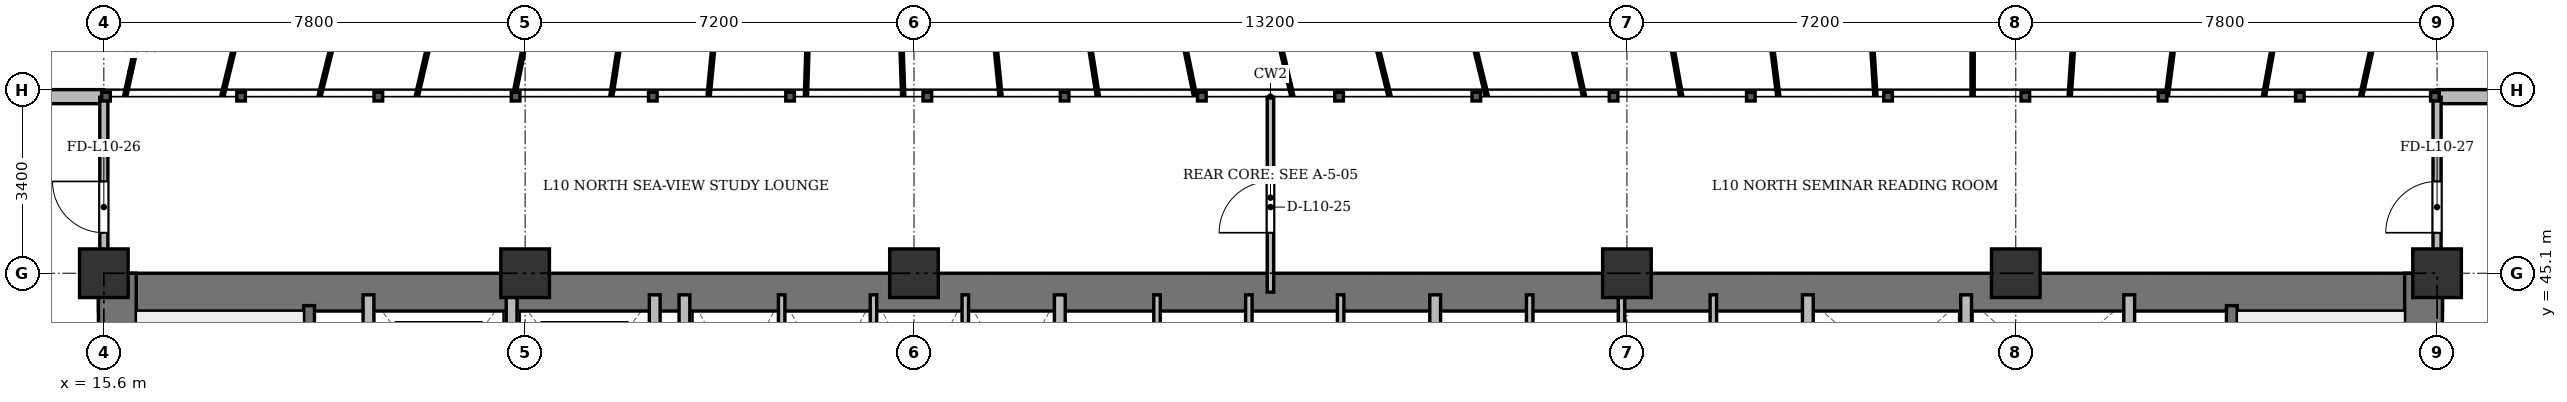
"""IFC4 building model, lengths in metres.
Left out: names, types, materials, properties, quantities, classifications, styles, units other than length and angle.
Written with IfcOpenShell. Run it as: python <this file> out.ifc"""

import sys

from ifc_helpers import new_model, si_unit, direction, frame, frame_2d, origin, origin_2d, place, context, subcontext, project, spatial, rectangle, extrude, source, transform, mapped, element, fill, save


model = new_model("IFC4")
c1 = context("Model", 3, precision=1e-05, world=origin(), true_north=direction((0.0, 1.0)))
c2 = subcontext(c1, "Body", "Model", "MODEL_VIEW")
j1 = project(units=[si_unit("LENGTHUNIT", "METRE"), si_unit("PLANEANGLEUNIT", "RADIAN")], contexts=[c1])
p1 = place(None, origin())
s1 = spatial("IfcSite", under=j1, at=p1, CompositionType="ELEMENT")
p2 = place(p1, origin())
s2 = spatial("IfcBuilding", under=s1, at=p2, CompositionType="ELEMENT")
p3 = place(p2, frame((0.0, 0.0, 41.5)))
s3 = spatial("IfcBuildingStorey", under=s2, at=p3, CompositionType="ELEMENT", Elevation=41.5)
m1 = source(origin(), c2, "Body", "SweptSolid", [
    extrude(rectangle(XDim=0.9, YDim=0.9, at=origin_2d()), origin(), (0.0, 0.0, 1.0), 3.6),
])
for number, where, z_axis, x_axis in (
    (1, (15.6, 45.1, 0.0), (0.0, 0.0, 1.0), (1.0, 0.0, 0.0)),
    (2, (23.4, 45.1, 0.0), (0.0, 0.0, 1.0), (1.0, 0.0, 0.0)),
    (3, (30.6, 45.1, 0.0), (0.0, 0.0, 1.0), (1.0, 0.0, 0.0)),
    (4, (43.8, 45.1, 0.0), (0.0, 0.0, 1.0), (1.0, 0.0, 0.0)),
    (5, (51.0, 45.1, 0.0), (0.0, 0.0, 1.0), (1.0, 0.0, 0.0)),
    (6, (58.8, 45.1, 0.0), (0.0, 0.0, 1.0), (1.0, 0.0, 0.0)),
):
    element("IfcColumn", number, at=place(p3, frame(where, z_axis=z_axis, x_axis=x_axis)), inside=s3, PredefinedType="COLUMN", context=c2, shape_type="MappedRepresentation", body=[
        mapped(m1, transform((0.0, 0.0, 0.0), x_axis=(1.0, 0.0, 0.0), y_axis=(0.0, 1.0, 0.0), z_axis=(0.0, 0.0, 1.0), scale=1.0)),
    ])
p4 = place(p3, frame((7.6, 48.37, 0.0), z_axis=(0.0, 0.0, 1.0), x_axis=(1.0, 0.0, 0.0)))
e7 = element("IfcWall", 7, at=p4, inside=s3, PredefinedType="SOLIDWALL", context=c2, shape_type="SweptSolid", body=[
    extrude(rectangle(XDim=8.0, YDim=0.26, at=frame_2d((4.0, 0.0))), origin(), (0.0, 0.0, 1.0), 3.34),
])
p5 = place(p4, frame((3.308, 0.0, 0.9)))
e8 = element("IfcOpeningElement", 8, at=p5, cuts=e7, PredefinedType="OPENING", context=c2, shape_type="SweptSolid", body=[
    extrude(rectangle(XDim=1.2, YDim=1.65, at=frame_2d((0.6, 0.825))), frame((0.0, 0.14, 0.0), z_axis=(0.0, -1.0, 0.0), x_axis=(1.0, 0.0, 0.0)), (0.0, 0.0, 1.0), 0.28),
])
p6 = place(p3, frame((58.8, 48.37, 0.0), z_axis=(0.0, 0.0, 1.0), x_axis=(1.0, 0.0, 0.0)))
e9 = element("IfcWall", 9, at=p6, inside=s3, PredefinedType="SOLIDWALL", context=c2, shape_type="SweptSolid", body=[
    extrude(rectangle(XDim=8.0, YDim=0.26, at=frame_2d((4.0, 0.0))), origin(), (0.0, 0.0, 1.0), 3.34),
])
p7 = place(p6, frame((3.308, 0.0, 0.9)))
e10 = element("IfcOpeningElement", 10, at=p7, cuts=e9, PredefinedType="OPENING", context=c2, shape_type="SweptSolid", body=[
    extrude(rectangle(XDim=1.2, YDim=1.65, at=frame_2d((0.6, 0.825))), frame((0.0, 0.14, 0.0), z_axis=(0.0, -1.0, 0.0), x_axis=(1.0, 0.0, 0.0)), (0.0, 0.0, 1.0), 0.28),
])
p8 = place(p3, frame((15.5, 44.75, 0.0), z_axis=(0.0, 0.0, 1.0), x_axis=(1.0, 0.0, 0.0)))
e11 = element("IfcWall", 11, at=p8, inside=s3, PredefinedType="SHEAR", context=c2, shape_type="SweptSolid", body=[
    extrude(rectangle(XDim=43.4, YDim=0.7, at=frame_2d((21.7, 0.0))), origin(), (0.0, 0.0, 1.0), 3.34),
])
for number, where, z_axis, x_axis in (
    (12, (15.85, 33.4, 0.0), (0.0, 0.0, 1.0), (0.0, 1.0, 0.0)),
    (13, (58.55, 33.4, 0.0), (0.0, 0.0, 1.0), (0.0, 1.0, 0.0)),
):
    element("IfcWall", number, at=place(p3, frame(where, z_axis=z_axis, x_axis=x_axis)), inside=s3, PredefinedType="SHEAR", context=c2, shape_type="SweptSolid", body=[
        extrude(rectangle(XDim=11.7, YDim=0.7, at=frame_2d((5.85, 0.0))), origin(), (0.0, 0.0, 1.0), 3.34),
    ])
p9 = place(p3, frame((19.4, 33.4, 0.0), z_axis=(0.0, 0.0, 1.0), x_axis=(0.0, 1.0, 0.0)))
e14 = element("IfcWall", 14, at=p9, inside=s3, PredefinedType="SHEAR", context=c2, shape_type="SweptSolid", body=[
    extrude(rectangle(XDim=11.1, YDim=0.2, at=frame_2d((5.55, 0.0))), origin(), (0.0, 0.0, 1.0), 3.34),
])
p10 = place(p9, frame((0.85, 0.0, 0.0)))
e15 = element("IfcOpeningElement", 15, at=p10, cuts=e14, PredefinedType="OPENING", context=c2, shape_type="SweptSolid", body=[
    extrude(rectangle(XDim=1.1, YDim=2.15, at=frame_2d((0.55, 1.075))), frame((0.0, 0.11, 0.0), z_axis=(0.0, -1.0, 0.0), x_axis=(1.0, 0.0, 0.0)), (0.0, 0.0, 1.0), 0.22),
])
p11 = place(p3, frame((55.0, 33.4, 0.0), z_axis=(0.0, 0.0, 1.0), x_axis=(0.0, 1.0, 0.0)))
e16 = element("IfcWall", 16, at=p11, inside=s3, PredefinedType="SHEAR", context=c2, shape_type="SweptSolid", body=[
    extrude(rectangle(XDim=11.1, YDim=0.2, at=frame_2d((5.55, 0.0))), origin(), (0.0, 0.0, 1.0), 3.34),
])
p12 = place(p11, frame((0.85, 0.0, 0.0)))
e17 = element("IfcOpeningElement", 17, at=p12, cuts=e16, PredefinedType="OPENING", context=c2, shape_type="SweptSolid", body=[
    extrude(rectangle(XDim=1.1, YDim=2.15, at=frame_2d((0.55, 1.075))), frame((0.0, 0.11, 0.0), z_axis=(0.0, -1.0, 0.0), x_axis=(1.0, 0.0, 0.0)), (0.0, 0.0, 1.0), 0.22),
])
for number, where, z_axis, x_axis in (
    (18, (20.5, 41.3, 0.0), (0.0, 0.0, 1.0), (0.0, 1.0, 0.0)),
    (19, (23.15, 41.3, 0.0), (0.0, 0.0, 1.0), (0.0, 1.0, 0.0)),
    (20, (25.8, 41.3, 0.0), (0.0, 0.0, 1.0), (0.0, 1.0, 0.0)),
):
    element("IfcWall", number, at=place(p3, frame(where, z_axis=z_axis, x_axis=x_axis)), inside=s3, PredefinedType="SOLIDWALL", context=c2, shape_type="SweptSolid", body=[
        extrude(rectangle(XDim=3.4, YDim=0.2, at=frame_2d((1.7, 0.0))), origin(), (0.0, 0.0, 1.0), 3.34),
    ])
p13 = place(p3, frame((26.35, 33.4, 0.0), z_axis=(0.0, 0.0, 1.0), x_axis=(0.0, 1.0, 0.0)))
e21 = element("IfcWall", 21, at=p13, inside=s3, PredefinedType="SOLIDWALL", context=c2, shape_type="SweptSolid", body=[
    extrude(rectangle(XDim=11.3, YDim=0.2, at=frame_2d((5.65, 0.0))), origin(), (0.0, 0.0, 1.0), 2.69),
])
p14 = place(p3, frame((33.3, 41.5, 0.0), z_axis=(0.0, 0.0, 1.0), x_axis=(0.0, 1.0, 0.0)))
e22 = element("IfcWall", 22, at=p14, inside=s3, PredefinedType="SOLIDWALL", context=c2, shape_type="SweptSolid", body=[
    extrude(rectangle(XDim=3.2, YDim=0.2, at=frame_2d((1.6, 0.0))), origin(), (0.0, 0.0, 1.0), 3.34),
])
for number, where, z_axis, x_axis in (
    (23, (28.15, 41.5, 0.0), (0.0, 0.0, 1.0), (0.0, 1.0, 0.0)),
    (24, (29.85, 41.5, 0.0), (0.0, 0.0, 1.0), (0.0, 1.0, 0.0)),
    (25, (31.55, 41.5, 0.0), (0.0, 0.0, 1.0), (0.0, 1.0, 0.0)),
    (26, (35.1, 41.5, 0.0), (0.0, 0.0, 1.0), (0.0, 1.0, 0.0)),
    (27, (36.8, 41.5, 0.0), (0.0, 0.0, 1.0), (0.0, 1.0, 0.0)),
    (28, (38.5, 41.5, 0.0), (0.0, 0.0, 1.0), (0.0, 1.0, 0.0)),
):
    element("IfcWall", number, at=place(p3, frame(where, z_axis=z_axis, x_axis=x_axis)), inside=s3, PredefinedType="PARTITIONING", context=c2, shape_type="SweptSolid", body=[
        extrude(rectangle(XDim=3.2, YDim=0.12, at=frame_2d((1.6, 0.0))), origin(), (0.0, 0.0, 1.0), 3.34),
    ])
p15 = place(p3, frame((40.25, 41.5, 0.0), z_axis=(0.0, 0.0, 1.0), x_axis=(0.0, 1.0, 0.0)))
e29 = element("IfcWall", 29, at=p15, inside=s3, PredefinedType="SOLIDWALL", context=c2, shape_type="SweptSolid", body=[
    extrude(rectangle(XDim=3.2, YDim=0.2, at=frame_2d((1.6, 0.0))), origin(), (0.0, 0.0, 1.0), 3.34),
])
p16 = place(p3, frame((42.0, 41.5, 0.0), z_axis=(0.0, 0.0, 1.0), x_axis=(0.0, 1.0, 0.0)))
e30 = element("IfcWall", 30, at=p16, inside=s3, PredefinedType="PARTITIONING", context=c2, shape_type="SweptSolid", body=[
    extrude(rectangle(XDim=3.2, YDim=0.12, at=frame_2d((1.6, 0.0))), origin(), (0.0, 0.0, 1.0), 3.34),
])
p17 = place(p3, frame((43.7, 41.5, 0.0), z_axis=(0.0, 0.0, 1.0), x_axis=(0.0, 1.0, 0.0)))
e31 = element("IfcWall", 31, at=p17, inside=s3, PredefinedType="PARTITIONING", context=c2, shape_type="SweptSolid", body=[
    extrude(rectangle(XDim=3.2, YDim=0.12, at=frame_2d((1.6, 0.0))), origin(), (0.0, 0.0, 1.0), 2.752),
])
p18 = place(p3, frame((45.4, 41.5, 0.0), z_axis=(0.0, 0.0, 1.0), x_axis=(0.0, 1.0, 0.0)))
e32 = element("IfcWall", 32, at=p18, inside=s3, PredefinedType="PARTITIONING", context=c2, shape_type="SweptSolid", body=[
    extrude(rectangle(XDim=3.2, YDim=0.12, at=frame_2d((1.6, 0.0))), origin(), (0.0, 0.0, 1.0), 3.34),
])
p19 = place(p3, frame((47.15, 33.4, 0.0), z_axis=(0.0, 0.0, 1.0), x_axis=(0.0, 1.0, 0.0)))
e33 = element("IfcWall", 33, at=p19, inside=s3, PredefinedType="SOLIDWALL", context=c2, shape_type="SweptSolid", body=[
    extrude(rectangle(XDim=11.3, YDim=0.2, at=frame_2d((5.65, 0.0))), origin(), (0.0, 0.0, 1.0), 2.69),
])
for number, where, z_axis, x_axis in (
    (34, (50.08, 42.05, 0.0), (0.0, 0.0, 1.0), (0.0, 1.0, 0.0)),
    (35, (53.1, 42.05, 0.0), (0.0, 0.0, 1.0), (0.0, 1.0, 0.0)),
):
    element("IfcWall", number, at=place(p3, frame(where, z_axis=z_axis, x_axis=x_axis)), inside=s3, PredefinedType="SOLIDWALL", context=c2, shape_type="SweptSolid", body=[
        extrude(rectangle(XDim=2.65, YDim=0.2, at=frame_2d((1.325, 0.0))), origin(), (0.0, 0.0, 1.0), 3.34),
    ])
p20 = place(p3, frame((37.2, 44.75, 0.0), z_axis=(0.0, 0.0, 1.0), x_axis=(0.0, 1.0, 0.0)))
e36 = element("IfcWall", 36, at=p20, inside=s3, PredefinedType="PARTITIONING", context=c2, shape_type="SweptSolid", body=[
    extrude(rectangle(XDim=3.61, YDim=0.12, at=frame_2d((1.805, 0.0))), origin(), (0.0, 0.0, 1.0), 2.69),
])
p21 = place(p20, frame((1.1, 0.0, 0.0)))
e37 = element("IfcOpeningElement", 37, at=p21, cuts=e36, PredefinedType="OPENING", context=c2, shape_type="SweptSolid", body=[
    extrude(rectangle(XDim=0.95, YDim=2.15, at=frame_2d((0.475, 1.075))), frame((0.0, 0.07, 0.0), z_axis=(0.0, -1.0, 0.0), x_axis=(1.0, 0.0, 0.0)), (0.0, 0.0, 1.0), 0.14),
])
p22 = place(p3, frame((15.6, 44.75, 0.0), z_axis=(0.0, 0.0, 1.0), x_axis=(0.0, 1.0, 0.0)))
e38 = element("IfcWall", 38, at=p22, inside=s3, PredefinedType="PARTITIONING", context=c2, shape_type="SweptSolid", body=[
    extrude(rectangle(XDim=3.61, YDim=0.15, at=frame_2d((1.805, 0.0))), origin(), (0.0, 0.0, 1.0), 2.752),
])
p23 = place(p22, frame((1.1, 0.0, 0.0)))
e39 = element("IfcOpeningElement", 39, at=p23, cuts=e38, PredefinedType="OPENING", context=c2, shape_type="SweptSolid", body=[
    extrude(rectangle(XDim=0.95, YDim=2.15, at=frame_2d((0.475, 1.075))), frame((0.0, 0.085, 0.0), z_axis=(0.0, -1.0, 0.0), x_axis=(1.0, 0.0, 0.0)), (0.0, 0.0, 1.0), 0.17),
])
p24 = place(p3, frame((58.8, 44.75, 0.0), z_axis=(0.0, 0.0, 1.0), x_axis=(0.0, 1.0, 0.0)))
e40 = element("IfcWall", 40, at=p24, inside=s3, PredefinedType="PARTITIONING", context=c2, shape_type="SweptSolid", body=[
    extrude(rectangle(XDim=3.61, YDim=0.15, at=frame_2d((1.805, 0.0))), origin(), (0.0, 0.0, 1.0), 2.752),
])
p25 = place(p24, frame((1.1, 0.0, 0.0)))
e41 = element("IfcOpeningElement", 41, at=p25, cuts=e40, PredefinedType="OPENING", context=c2, shape_type="SweptSolid", body=[
    extrude(rectangle(XDim=0.95, YDim=2.15, at=frame_2d((0.475, 1.075))), frame((0.0, 0.085, 0.0), z_axis=(0.0, -1.0, 0.0), x_axis=(1.0, 0.0, 0.0)), (0.0, 0.0, 1.0), 0.17),
])
m2 = source(origin(), c2, "Body", "SweptSolid", [
    extrude(rectangle(XDim=0.95, YDim=2.15, at=frame_2d((0.475, 1.075))), frame((0.0, 0.025, 0.0), z_axis=(0.0, -1.0, 0.0), x_axis=(1.0, 0.0, 0.0)), (0.0, 0.0, 1.0), 0.05),
])
p26 = place(p21, origin())
e42 = element("IfcDoor", 42, at=p26, inside=s3, OperationType="SINGLE_SWING_LEFT", PredefinedType="DOOR", context=c2, shape_type="MappedRepresentation", body=[
    mapped(m2, transform((0.0, 0.0, 0.0), x_axis=(1.0, 0.0, 0.0), y_axis=(0.0, 1.0, 0.0), z_axis=(0.0, 0.0, 1.0), scale=1.0)),
])
fill(e37, e42)
p27 = place(p23, origin())
e43 = element("IfcDoor", 43, at=p27, inside=s3, OperationType="SINGLE_SWING_RIGHT", PredefinedType="DOOR", context=c2, shape_type="MappedRepresentation", body=[
    mapped(m2, transform((0.0, 0.0, 0.0), x_axis=(1.0, 0.0, 0.0), y_axis=(0.0, 1.0, 0.0), z_axis=(0.0, 0.0, 1.0), scale=1.0)),
])
fill(e39, e43)
p28 = place(p25, origin())
e44 = element("IfcDoor", 44, at=p28, inside=s3, OperationType="SINGLE_SWING_LEFT", PredefinedType="DOOR", context=c2, shape_type="MappedRepresentation", body=[
    mapped(m2, transform((0.0, 0.0, 0.0), x_axis=(1.0, 0.0, 0.0), y_axis=(0.0, 1.0, 0.0), z_axis=(0.0, 0.0, 1.0), scale=1.0)),
])
fill(e41, e44)
save(model, sys.argv[1])
